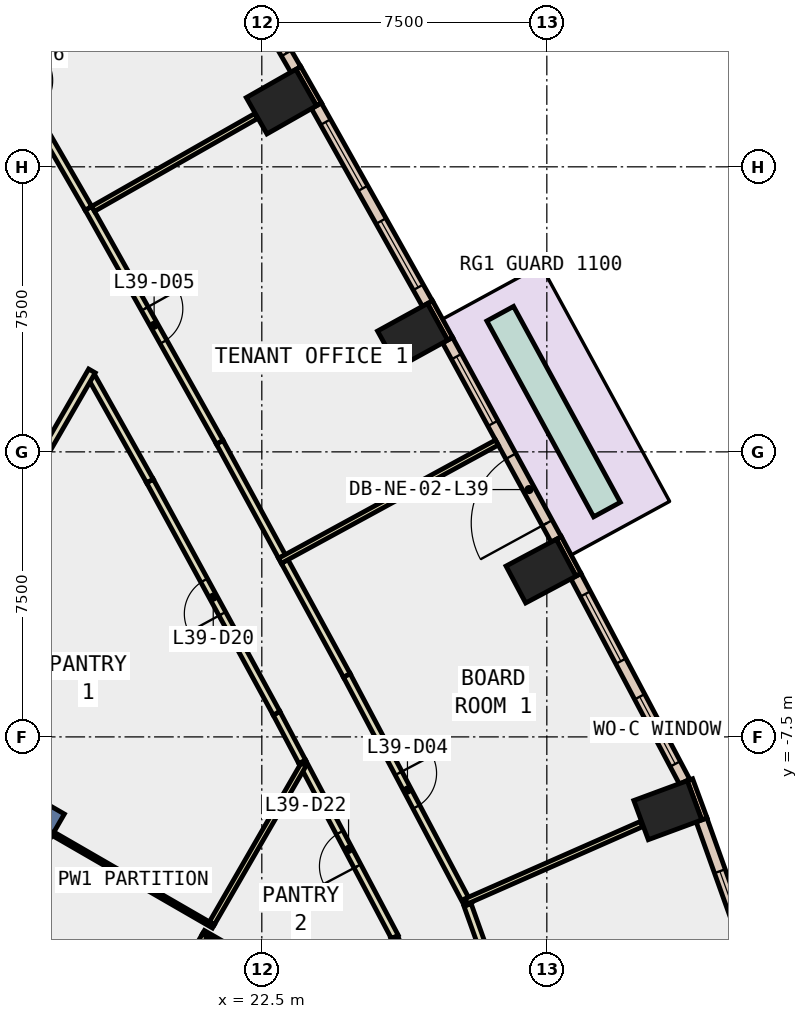
"""IFC4 building model, lengths in metres.
Left out: names, types, materials, properties, quantities, classifications, styles, units other than length and angle.
Written with IfcOpenShell. Run it as: python <this file> out.ifc"""

import sys

from ifc_helpers import new_model, si_unit, direction, frame, frame_2d, origin, origin_2d, place, context, subcontext, project, spatial, rectangle, extrude, element, fill, save


model = new_model("IFC4")
c1 = context("Model", 3, precision=1e-05, world=origin(), true_north=direction((0.0, 1.0)))
c2 = subcontext(c1, "Body", "Model", "MODEL_VIEW")
j1 = project(units=[si_unit("LENGTHUNIT", "METRE"), si_unit("PLANEANGLEUNIT", "RADIAN")], contexts=[c1])
p1 = place(None, origin())
s1 = spatial("IfcSite", under=j1, at=p1, CompositionType="ELEMENT")
p2 = place(p1, origin())
s2 = spatial("IfcBuilding", under=s1, at=p2, CompositionType="ELEMENT")
p3 = place(p2, frame((0.0, 0.0, 176.0)))
s3 = spatial("IfcBuildingStorey", under=s2, at=p3, CompositionType="ELEMENT", Elevation=176.0)
for number, where, z_axis, x_axis in (
    (1, (33.183, -9.429, -0.4), (0.0, 0.0, 1.0), (-0.347, 0.938, 0.0)),
    (2, (29.847, -3.138, -0.4), (0.0, 0.0, 1.0), (-0.47, 0.883, 0.0)),
    (3, (26.468, 3.059, -0.4), (0.0, 0.0, 1.0), (-0.482, 0.876, 0.0)),
    (4, (23.015, 9.214, -0.4), (0.0, 0.0, 1.0), (-0.494, 0.869, 0.0)),
):
    element("IfcColumn", number, at=place(p3, frame(where, z_axis=z_axis, x_axis=x_axis)), inside=s3, PredefinedType="COLUMN", context=c2, shape_type="SweptSolid", body=[
        extrude(rectangle(XDim=1.1, YDim=1.5, at=origin_2d()), origin(), (0.0, 0.0, 1.0), 4.2),
    ])
p4 = place(p3, frame((9.31, -5.375, -0.4), z_axis=(0.0, 0.0, 1.0), x_axis=(0.866017533419, -0.500013631625, 0.0)))
e5 = element("IfcWall", 5, at=p4, inside=s3, PredefinedType="SHEAR", context=c2, shape_type="SweptSolid", body=[
    extrude(rectangle(XDim=9.0, YDim=0.8, at=frame_2d((4.5, 0.0))), origin(), (0.0, 0.0, 1.0), 4.2),
])
p5 = place(p3, frame((34.147, -9.659, 0.0), z_axis=(0.0, 0.0, 1.0), x_axis=(-0.346229846278, 0.938149718087, 0.0)))
e6 = element("IfcWall", 6, at=p5, inside=s3, PredefinedType="STANDARD", context=c2, shape_type="SweptSolid", body=[
    extrude(rectangle(XDim=1.1, YDim=0.15, at=frame_2d((0.55, 0.0))), origin(), (0.0, 0.0, 1.0), 3.8),
])
p6 = place(p3, frame((30.833, -3.236, 0.0), z_axis=(0.0, 0.0, 1.0), x_axis=(-0.469966207956, 0.882684407577, 0.0)))
e7 = element("IfcWall", 7, at=p6, inside=s3, PredefinedType="STANDARD", context=c2, shape_type="SweptSolid", body=[
    extrude(rectangle(XDim=1.1, YDim=0.15, at=frame_2d((0.55, 0.0))), origin(), (0.0, 0.0, 1.0), 3.8),
])
p7 = place(p3, frame((27.456, 2.975, 0.0), z_axis=(0.0, 0.0, 1.0), x_axis=(-0.481850587491, 0.876253394478, 0.0)))
e8 = element("IfcWall", 8, at=p7, inside=s3, PredefinedType="STANDARD", context=c2, shape_type="SweptSolid", body=[
    extrude(rectangle(XDim=1.1, YDim=0.15, at=frame_2d((0.55, 0.0))), origin(), (0.0, 0.0, 1.0), 3.8),
])
p8 = place(p3, frame((24.005, 9.144, 0.0), z_axis=(0.0, 0.0, 1.0), x_axis=(-0.494512685492, 0.869170411305, 0.0)))
e9 = element("IfcWall", 9, at=p8, inside=s3, PredefinedType="STANDARD", context=c2, shape_type="SweptSolid", body=[
    extrude(rectangle(XDim=1.1, YDim=0.15, at=frame_2d((0.55, 0.0))), origin(), (0.0, 0.0, 1.0), 3.8),
])
p9 = place(p3, frame((35.506, -13.7, 0.0), z_axis=(0.0, 0.0, 1.0), x_axis=(-0.336652028742, 0.941629126325, 0.0)))
e10 = element("IfcWall", 10, at=p9, inside=s3, PredefinedType="STANDARD", context=c2, shape_type="SweptSolid", body=[
    extrude(rectangle(XDim=4.263, YDim=0.3, at=frame_2d((2.131, 0.0))), origin(), (0.0, 0.0, 1.0), 3.8),
])
p10 = place(p9, frame((1.431, 0.0, 0.9)))
e11 = element("IfcOpeningElement", 11, at=p10, cuts=e10, PredefinedType="OPENING", context=c2, shape_type="SweptSolid", body=[
    extrude(rectangle(XDim=1.4, YDim=2.6, at=frame_2d((0.7, 1.3))), frame((0.0, 0.16, 0.0), z_axis=(0.0, -1.0, 0.0), x_axis=(1.0, 0.0, 0.0)), (0.0, 0.0, 1.0), 0.32),
])
p11 = place(p3, frame((33.626, -8.68, 0.0), z_axis=(0.0, 0.0, 1.0), x_axis=(-0.467572383403, 0.883954787463, 0.0)))
e12 = element("IfcWall", 12, at=p11, inside=s3, PredefinedType="STANDARD", context=c2, shape_type="SweptSolid", body=[
    extrude(rectangle(XDim=6.119, YDim=0.3, at=frame_2d((3.06, 0.0))), origin(), (0.0, 0.0, 1.0), 3.8),
])
p12 = place(p11, frame((0.53, 0.0, 0.9)))
e13 = element("IfcOpeningElement", 13, at=p12, cuts=e12, PredefinedType="OPENING", context=c2, shape_type="SweptSolid", body=[
    extrude(rectangle(XDim=2.0, YDim=2.6, at=frame_2d((1.0, 1.3))), frame((0.0, 0.16, 0.0), z_axis=(0.0, -1.0, 0.0), x_axis=(1.0, 0.0, 0.0)), (0.0, 0.0, 1.0), 0.32),
])
p13 = place(p11, frame((3.589, 0.0, 0.9)))
e14 = element("IfcOpeningElement", 14, at=p13, cuts=e12, PredefinedType="OPENING", context=c2, shape_type="SweptSolid", body=[
    extrude(rectangle(XDim=2.0, YDim=2.6, at=frame_2d((1.0, 1.3))), frame((0.0, 0.16, 0.0), z_axis=(0.0, -1.0, 0.0), x_axis=(1.0, 0.0, 0.0)), (0.0, 0.0, 1.0), 0.32),
])
p14 = place(p3, frame((30.246, -2.303, 0.0), z_axis=(0.0, 0.0, 1.0), x_axis=(-0.478711740571, 0.877972134774, 0.0)))
e15 = element("IfcWall", 15, at=p14, inside=s3, PredefinedType="STANDARD", context=c2, shape_type="SweptSolid", body=[
    extrude(rectangle(XDim=5.97, YDim=0.3, at=frame_2d((2.985, 0.0))), origin(), (0.0, 0.0, 1.0), 3.8),
])
p15 = place(p14, frame((0.493, 0.0, 0.0)))
e16 = element("IfcOpeningElement", 16, at=p15, cuts=e15, PredefinedType="OPENING", context=c2, shape_type="SweptSolid", body=[
    extrude(rectangle(XDim=2.0, YDim=2.4, at=frame_2d((1.0, 1.2))), frame((0.0, 0.16, 0.0), z_axis=(0.0, -1.0, 0.0), x_axis=(1.0, 0.0, 0.0)), (0.0, 0.0, 1.0), 0.32),
])
p16 = place(p14, frame((3.478, 0.0, 0.9)))
e17 = element("IfcOpeningElement", 17, at=p16, cuts=e15, PredefinedType="OPENING", context=c2, shape_type="SweptSolid", body=[
    extrude(rectangle(XDim=2.0, YDim=2.6, at=frame_2d((1.0, 1.3))), frame((0.0, 0.16, 0.0), z_axis=(0.0, -1.0, 0.0), x_axis=(1.0, 0.0, 0.0)), (0.0, 0.0, 1.0), 0.32),
])
p17 = place(p3, frame((26.857, 3.9, 0.0), z_axis=(0.0, 0.0, 1.0), x_axis=(-0.489305602904, 0.872112393541, 0.0)))
e18 = element("IfcWall", 18, at=p17, inside=s3, PredefinedType="STANDARD", context=c2, shape_type="SweptSolid", body=[
    extrude(rectangle(XDim=5.969, YDim=0.3, at=frame_2d((2.985, 0.0))), origin(), (0.0, 0.0, 1.0), 3.8),
])
p18 = place(p17, frame((0.492, 0.0, 0.9)))
e19 = element("IfcOpeningElement", 19, at=p18, cuts=e18, PredefinedType="OPENING", context=c2, shape_type="SweptSolid", body=[
    extrude(rectangle(XDim=2.0, YDim=2.6, at=frame_2d((1.0, 1.3))), frame((0.0, 0.16, 0.0), z_axis=(0.0, -1.0, 0.0), x_axis=(1.0, 0.0, 0.0)), (0.0, 0.0, 1.0), 0.32),
])
p19 = place(p17, frame((3.477, 0.0, 0.9)))
e20 = element("IfcOpeningElement", 20, at=p19, cuts=e18, PredefinedType="OPENING", context=c2, shape_type="SweptSolid", body=[
    extrude(rectangle(XDim=2.0, YDim=2.6, at=frame_2d((1.0, 1.3))), frame((0.0, 0.16, 0.0), z_axis=(0.0, -1.0, 0.0), x_axis=(1.0, 0.0, 0.0)), (0.0, 0.0, 1.0), 0.32),
])
p20 = place(p3, frame((23.393, 10.06, 0.0), z_axis=(0.0, 0.0, 1.0), x_axis=(-0.499908916093, 0.866077984716, 0.0)))
e21 = element("IfcWall", 21, at=p20, inside=s3, PredefinedType="STANDARD", context=c2, shape_type="SweptSolid", body=[
    extrude(rectangle(XDim=5.969, YDim=0.3, at=frame_2d((2.985, 0.0))), origin(), (0.0, 0.0, 1.0), 3.8),
])
p21 = place(p20, frame((0.492, 0.0, 0.9)))
e22 = element("IfcOpeningElement", 22, at=p21, cuts=e21, PredefinedType="OPENING", context=c2, shape_type="SweptSolid", body=[
    extrude(rectangle(XDim=2.0, YDim=2.6, at=frame_2d((1.0, 1.3))), frame((0.0, 0.16, 0.0), z_axis=(0.0, -1.0, 0.0), x_axis=(1.0, 0.0, 0.0)), (0.0, 0.0, 1.0), 0.32),
])
p22 = place(p20, frame((3.477, 0.0, 0.9)))
e23 = element("IfcOpeningElement", 23, at=p22, cuts=e21, PredefinedType="OPENING", context=c2, shape_type="SweptSolid", body=[
    extrude(rectangle(XDim=2.0, YDim=2.6, at=frame_2d((1.0, 1.3))), frame((0.0, 0.16, 0.0), z_axis=(0.0, -1.0, 0.0), x_axis=(1.0, 0.0, 0.0)), (0.0, 0.0, 1.0), 0.32),
])
p23 = place(p3, frame((31.583, -1.518, 0.0), z_axis=(0.0, 0.0, 1.0), x_axis=(-0.478688945337, 0.877984563425, 0.0)))
e24 = element("IfcWall", 24, at=p23, inside=s3, PredefinedType="STANDARD", context=c2, shape_type="SweptSolid", body=[
    extrude(rectangle(XDim=5.87, YDim=0.8, at=frame_2d((2.935, 0.0))), origin(), (0.0, 0.0, 1.0), 0.8),
])
p24 = place(p3, frame((23.565, -8.158, 0.0), z_axis=(0.0, 0.0, 1.0), x_axis=(-0.46753134131, 0.883976495668, 0.0)))
e25 = element("IfcWall", 25, at=p24, inside=s3, PredefinedType="PARTITIONING", context=c2, shape_type="SweptSolid", body=[
    extrude(rectangle(XDim=1.448, YDim=0.2, at=frame_2d((0.724, 0.0))), origin(), (0.0, 0.0, 1.0), 3.75),
])
p25 = place(p3, frame((22.888, -6.878, 0.0), z_axis=(0.0, 0.0, 1.0), x_axis=(-0.478665365973, 0.877997418799, 0.0)))
e26 = element("IfcWall", 26, at=p25, inside=s3, PredefinedType="PARTITIONING", context=c2, shape_type="SweptSolid", body=[
    extrude(rectangle(XDim=6.961, YDim=0.2, at=frame_2d((3.48, 0.0))), origin(), (0.0, 0.0, 1.0), 3.75),
])
p26 = place(p25, frame((2.981, 0.0, 0.0)))
e27 = element("IfcOpeningElement", 27, at=p26, cuts=e26, PredefinedType="OPENING", context=c2, shape_type="SweptSolid", body=[
    extrude(rectangle(XDim=1.0, YDim=2.1, at=frame_2d((0.5, 1.05))), frame((0.0, 0.11, 0.0), z_axis=(0.0, -1.0, 0.0), x_axis=(1.0, 0.0, 0.0)), (0.0, 0.0, 1.0), 0.22),
])
p27 = place(p3, frame((19.556, -0.766, 0.0), z_axis=(0.0, 0.0, 1.0), x_axis=(-0.489198731197, 0.872172346154, 0.0)))
e28 = element("IfcWall", 28, at=p27, inside=s3, PredefinedType="PARTITIONING", context=c2, shape_type="SweptSolid", body=[
    extrude(rectangle(XDim=3.121, YDim=0.2, at=frame_2d((1.561, 0.0))), origin(), (0.0, 0.0, 1.0), 3.75),
])
p28 = place(p3, frame((26.758, -14.926, 0.0), z_axis=(0.0, 0.0, 1.0), x_axis=(-0.33645112914, 0.941700927949, 0.0)))
e29 = element("IfcWall", 29, at=p28, inside=s3, PredefinedType="PARTITIONING", context=c2, shape_type="SweptSolid", body=[
    extrude(rectangle(XDim=2.292, YDim=0.2, at=frame_2d((1.146, 0.0))), origin(), (0.0, 0.0, 1.0), 3.75),
])
p29 = place(p3, frame((26.0, -12.762, 0.0), z_axis=(0.0, 0.0, 1.0), x_axis=(-0.467534471159, 0.883974840297, 0.0)))
e30 = element("IfcWall", 30, at=p29, inside=s3, PredefinedType="PARTITIONING", context=c2, shape_type="SweptSolid", body=[
    extrude(rectangle(XDim=5.208, YDim=0.2, at=frame_2d((2.604, 0.0))), origin(), (0.0, 0.0, 1.0), 3.75),
])
p30 = place(p29, frame((2.104, 0.0, 0.0)))
e31 = element("IfcOpeningElement", 31, at=p30, cuts=e30, PredefinedType="OPENING", context=c2, shape_type="SweptSolid", body=[
    extrude(rectangle(XDim=1.0, YDim=2.1, at=frame_2d((0.5, 1.05))), frame((0.0, 0.11, 0.0), z_axis=(0.0, -1.0, 0.0), x_axis=(1.0, 0.0, 0.0)), (0.0, 0.0, 1.0), 0.22),
])
p31 = place(p3, frame((27.913, -11.919, 0.0), z_axis=(0.0, 0.0, 1.0), x_axis=(0.336864004528, -0.941553313654, 0.0)))
e32 = element("IfcWall", 32, at=p31, inside=s3, PredefinedType="PARTITIONING", context=c2, shape_type="SweptSolid", body=[
    extrude(rectangle(XDim=3.048, YDim=0.2, at=frame_2d((1.524, 0.0))), origin(), (0.0, 0.0, 1.0), 3.75),
])
p32 = place(p3, frame((23.102, -2.884, 0.0), z_axis=(0.0, 0.0, 1.0), x_axis=(0.478646929322, -0.878007469815, 0.0)))
e33 = element("IfcWall", 33, at=p32, inside=s3, PredefinedType="PARTITIONING", context=c2, shape_type="SweptSolid", body=[
    extrude(rectangle(XDim=3.418, YDim=0.2, at=frame_2d((1.709, 0.0))), origin(), (0.0, 0.0, 1.0), 3.75),
])
p33 = place(p3, frame((24.738, -5.885, 0.0), z_axis=(0.0, 0.0, 1.0), x_axis=(0.467616297571, -0.883931557444, 0.0)))
e34 = element("IfcWall", 34, at=p33, inside=s3, PredefinedType="PARTITIONING", context=c2, shape_type="SweptSolid", body=[
    extrude(rectangle(XDim=6.82, YDim=0.2, at=frame_2d((3.41, 0.0))), origin(), (0.0, 0.0, 1.0), 3.75),
])
p34 = place(p33, frame((2.91, 0.0, 0.0)))
e35 = element("IfcOpeningElement", 35, at=p34, cuts=e34, PredefinedType="OPENING", context=c2, shape_type="SweptSolid", body=[
    extrude(rectangle(XDim=1.0, YDim=2.1, at=frame_2d((0.5, 1.05))), frame((0.0, 0.11, 0.0), z_axis=(0.0, -1.0, 0.0), x_axis=(1.0, 0.0, 0.0)), (0.0, 0.0, 1.0), 0.22),
])
p35 = place(p3, frame((17.938, 6.411, 0.0), z_axis=(0.0, 0.0, 1.0), x_axis=(0.48930419744, -0.872113182086, 0.0)))
e36 = element("IfcWall", 36, at=p35, inside=s3, PredefinedType="PARTITIONING", context=c2, shape_type="SweptSolid", body=[
    extrude(rectangle(XDim=7.063, YDim=0.2, at=frame_2d((3.532, 0.0))), origin(), (0.0, 0.0, 1.0), 3.75),
])
p36 = place(p35, frame((3.032, 0.0, 0.0)))
e37 = element("IfcOpeningElement", 37, at=p36, cuts=e36, PredefinedType="OPENING", context=c2, shape_type="SweptSolid", body=[
    extrude(rectangle(XDim=1.0, YDim=2.1, at=frame_2d((0.5, 1.05))), frame((0.0, 0.11, 0.0), z_axis=(0.0, -1.0, 0.0), x_axis=(1.0, 0.0, 0.0)), (0.0, 0.0, 1.0), 0.22),
])
p37 = place(p3, frame((21.394, 0.251, 0.0), z_axis=(0.0, 0.0, 1.0), x_axis=(0.478406883784, -0.878138288397, 0.0)))
e38 = element("IfcWall", 38, at=p37, inside=s3, PredefinedType="PARTITIONING", context=c2, shape_type="SweptSolid", body=[
    extrude(rectangle(XDim=3.42, YDim=0.2, at=frame_2d((1.71, 0.0))), origin(), (0.0, 0.0, 1.0), 3.75),
])
p38 = place(p3, frame((14.482, 12.395, 0.0), z_axis=(0.0, 0.0, 1.0), x_axis=(0.499953847993, -0.866052048018, 0.0)))
e39 = element("IfcWall", 39, at=p38, inside=s3, PredefinedType="PARTITIONING", context=c2, shape_type="SweptSolid", body=[
    extrude(rectangle(XDim=6.911, YDim=0.2, at=frame_2d((3.456, 0.0))), origin(), (0.0, 0.0, 1.0), 3.75),
])
p39 = place(p38, frame((3.03, 0.0, 0.0)))
e40 = element("IfcOpeningElement", 40, at=p39, cuts=e39, PredefinedType="OPENING", context=c2, shape_type="SweptSolid", body=[
    extrude(rectangle(XDim=1.0, YDim=2.1, at=frame_2d((0.5, 1.05))), frame((0.0, 0.11, 0.0), z_axis=(0.0, -1.0, 0.0), x_axis=(1.0, 0.0, 0.0)), (0.0, 0.0, 1.0), 0.22),
])
p40 = place(p3, frame((18.03, 2.13, 0.0), z_axis=(0.0, 0.0, 1.0), x_axis=(-0.499919790729, -0.866071707676, 0.0)))
e41 = element("IfcWall", 41, at=p40, inside=s3, PredefinedType="PARTITIONING", context=c2, shape_type="SweptSolid", body=[
    extrude(rectangle(XDim=10.46, YDim=0.2, at=frame_2d((5.23, 0.0))), origin(), (0.0, 0.0, 1.0), 3.75),
])
p41 = place(p3, frame((17.004, -10.047, 0.0), z_axis=(0.0, 0.0, 1.0), x_axis=(0.865997117979, -0.500048989253, 0.0)))
e42 = element("IfcWall", 42, at=p41, inside=s3, PredefinedType="PARTITIONING", context=c2, shape_type="SweptSolid", body=[
    extrude(rectangle(XDim=4.875, YDim=0.1, at=frame_2d((2.438, 0.0))), origin(), (0.0, 0.0, 1.0), 3.75),
])
p42 = place(p3, frame((21.004, -12.719, 0.0), z_axis=(0.0, 0.0, 1.0), x_axis=(-0.499877157623, -0.866096315249, 0.0)))
e43 = element("IfcWall", 43, at=p42, inside=s3, PredefinedType="PARTITIONING", context=c2, shape_type="SweptSolid", body=[
    extrude(rectangle(XDim=5.191, YDim=0.15, at=frame_2d((2.596, 0.0))), origin(), (0.0, 0.0, 1.0), 3.75),
])
p43 = place(p3, frame((23.6, -8.224, 0.0), z_axis=(0.0, 0.0, 1.0), x_axis=(-0.500120854176, -0.865955617349, 0.0)))
e44 = element("IfcWall", 44, at=p43, inside=s3, PredefinedType="PARTITIONING", context=c2, shape_type="SweptSolid", body=[
    extrude(rectangle(XDim=4.827, YDim=0.15, at=frame_2d((2.414, 0.0))), origin(), (0.0, 0.0, 1.0), 3.75),
])
p44 = place(p3, frame((20.964, -12.638, 0.0), z_axis=(0.0, 0.0, 1.0), x_axis=(0.865981737723, -0.500075624211, 0.0)))
e45 = element("IfcWall", 45, at=p44, inside=s3, PredefinedType="PARTITIONING", context=c2, shape_type="SweptSolid", body=[
    extrude(rectangle(XDim=6.203, YDim=0.1, at=frame_2d((3.102, 0.0))), origin(), (0.0, 0.0, 1.0), 3.75),
])
p45 = place(p3, frame((27.88, -11.825, 0.0), z_axis=(0.0, 0.0, 1.0), x_axis=(0.915110098234, 0.403204052696, 0.0)))
e46 = element("IfcWall", 46, at=p45, inside=s3, PredefinedType="PARTITIONING", context=c2, shape_type="SweptSolid", body=[
    extrude(rectangle(XDim=5.044, YDim=0.15, at=frame_2d((2.522, 0.0))), origin(), (0.0, 0.0, 1.0), 3.75),
])
p46 = place(p3, frame((22.978, -2.866, 0.0), z_axis=(0.0, 0.0, 1.0), x_axis=(0.878049098929, 0.478570558925, 0.0)))
e47 = element("IfcWall", 47, at=p46, inside=s3, PredefinedType="PARTITIONING", context=c2, shape_type="SweptSolid", body=[
    extrude(rectangle(XDim=6.501, YDim=0.15, at=frame_2d((3.25, 0.0))), origin(), (0.0, 0.0, 1.0), 3.75),
])
p47 = place(p3, frame((18.062, 6.395, 0.0), z_axis=(0.0, 0.0, 1.0), x_axis=(0.869113540562, 0.494612629854, 0.0)))
e48 = element("IfcWall", 48, at=p47, inside=s3, PredefinedType="PARTITIONING", context=c2, shape_type="SweptSolid", body=[
    extrude(rectangle(XDim=4.929, YDim=0.15, at=frame_2d((2.465, 0.0))), origin(), (0.0, 0.0, 1.0), 3.75),
])
p48 = place(p10, origin())
e49 = element("IfcWindow", 49, at=p48, inside=s3, PartitioningType="SINGLE_PANEL", PredefinedType="WINDOW", context=c2, shape_type="SweptSolid", body=[
    extrude(rectangle(XDim=1.4, YDim=2.6, at=frame_2d((0.7, 1.3))), frame((0.0, 0.03, 0.0), z_axis=(0.0, -1.0, 0.0), x_axis=(1.0, 0.0, 0.0)), (0.0, 0.0, 1.0), 0.06),
])
fill(e11, e49)
p49 = place(p12, origin())
e50 = element("IfcWindow", 50, at=p49, inside=s3, PartitioningType="SINGLE_PANEL", PredefinedType="WINDOW", context=c2, shape_type="SweptSolid", body=[
    extrude(rectangle(XDim=2.0, YDim=2.6, at=frame_2d((1.0, 1.3))), frame((0.0, 0.03, 0.0), z_axis=(0.0, -1.0, 0.0), x_axis=(1.0, 0.0, 0.0)), (0.0, 0.0, 1.0), 0.06),
])
fill(e13, e50)
p50 = place(p13, origin())
e51 = element("IfcWindow", 51, at=p50, inside=s3, PartitioningType="SINGLE_PANEL", PredefinedType="WINDOW", context=c2, shape_type="SweptSolid", body=[
    extrude(rectangle(XDim=2.0, YDim=2.6, at=frame_2d((1.0, 1.3))), frame((0.0, 0.03, 0.0), z_axis=(0.0, -1.0, 0.0), x_axis=(1.0, 0.0, 0.0)), (0.0, 0.0, 1.0), 0.06),
])
fill(e14, e51)
p51 = place(p15, origin())
e52 = element("IfcDoor", 52, at=p51, inside=s3, OperationType="SLIDING_TO_LEFT", PredefinedType="DOOR", context=c2, shape_type="SweptSolid", body=[
    extrude(rectangle(XDim=2.0, YDim=2.4, at=frame_2d((1.0, 1.2))), frame((0.0, 0.025, 0.0), z_axis=(0.0, -1.0, 0.0), x_axis=(1.0, 0.0, 0.0)), (0.0, 0.0, 1.0), 0.05),
])
fill(e16, e52)
p52 = place(p16, origin())
e53 = element("IfcWindow", 53, at=p52, inside=s3, PartitioningType="SINGLE_PANEL", PredefinedType="WINDOW", context=c2, shape_type="SweptSolid", body=[
    extrude(rectangle(XDim=2.0, YDim=2.6, at=frame_2d((1.0, 1.3))), frame((0.0, 0.03, 0.0), z_axis=(0.0, -1.0, 0.0), x_axis=(1.0, 0.0, 0.0)), (0.0, 0.0, 1.0), 0.06),
])
fill(e17, e53)
p53 = place(p18, origin())
e54 = element("IfcWindow", 54, at=p53, inside=s3, PartitioningType="SINGLE_PANEL", PredefinedType="WINDOW", context=c2, shape_type="SweptSolid", body=[
    extrude(rectangle(XDim=2.0, YDim=2.6, at=frame_2d((1.0, 1.3))), frame((0.0, 0.03, 0.0), z_axis=(0.0, -1.0, 0.0), x_axis=(1.0, 0.0, 0.0)), (0.0, 0.0, 1.0), 0.06),
])
fill(e19, e54)
p54 = place(p19, origin())
e55 = element("IfcWindow", 55, at=p54, inside=s3, PartitioningType="SINGLE_PANEL", PredefinedType="WINDOW", context=c2, shape_type="SweptSolid", body=[
    extrude(rectangle(XDim=2.0, YDim=2.6, at=frame_2d((1.0, 1.3))), frame((0.0, 0.03, 0.0), z_axis=(0.0, -1.0, 0.0), x_axis=(1.0, 0.0, 0.0)), (0.0, 0.0, 1.0), 0.06),
])
fill(e20, e55)
p55 = place(p21, origin())
e56 = element("IfcWindow", 56, at=p55, inside=s3, PartitioningType="SINGLE_PANEL", PredefinedType="WINDOW", context=c2, shape_type="SweptSolid", body=[
    extrude(rectangle(XDim=2.0, YDim=2.6, at=frame_2d((1.0, 1.3))), frame((0.0, 0.03, 0.0), z_axis=(0.0, -1.0, 0.0), x_axis=(1.0, 0.0, 0.0)), (0.0, 0.0, 1.0), 0.06),
])
fill(e22, e56)
p56 = place(p34, origin())
e57 = element("IfcDoor", 57, at=p56, inside=s3, OperationType="SINGLE_SWING_LEFT", PredefinedType="DOOR", context=c2, shape_type="SweptSolid", body=[
    extrude(rectangle(XDim=1.0, YDim=2.1, at=frame_2d((0.5, 1.05))), frame((0.0, 0.025, 0.0), z_axis=(0.0, -1.0, 0.0), x_axis=(1.0, 0.0, 0.0)), (0.0, 0.0, 1.0), 0.05),
])
fill(e35, e57)
p57 = place(p36, origin())
e58 = element("IfcDoor", 58, at=p57, inside=s3, OperationType="SINGLE_SWING_LEFT", PredefinedType="DOOR", context=c2, shape_type="SweptSolid", body=[
    extrude(rectangle(XDim=1.0, YDim=2.1, at=frame_2d((0.5, 1.05))), frame((0.0, 0.025, 0.0), z_axis=(0.0, -1.0, 0.0), x_axis=(1.0, 0.0, 0.0)), (0.0, 0.0, 1.0), 0.05),
])
fill(e37, e58)
p58 = place(p26, origin())
e59 = element("IfcDoor", 59, at=p58, inside=s3, OperationType="SINGLE_SWING_LEFT", PredefinedType="DOOR", context=c2, shape_type="SweptSolid", body=[
    extrude(rectangle(XDim=1.0, YDim=2.1, at=frame_2d((0.5, 1.05))), frame((0.0, 0.025, 0.0), z_axis=(0.0, -1.0, 0.0), x_axis=(1.0, 0.0, 0.0)), (0.0, 0.0, 1.0), 0.05),
])
fill(e27, e59)
p59 = place(p30, origin())
e60 = element("IfcDoor", 60, at=p59, inside=s3, OperationType="SINGLE_SWING_LEFT", PredefinedType="DOOR", context=c2, shape_type="SweptSolid", body=[
    extrude(rectangle(XDim=1.0, YDim=2.1, at=frame_2d((0.5, 1.05))), frame((0.0, 0.025, 0.0), z_axis=(0.0, -1.0, 0.0), x_axis=(1.0, 0.0, 0.0)), (0.0, 0.0, 1.0), 0.05),
])
fill(e31, e60)
save(model, sys.argv[1])
